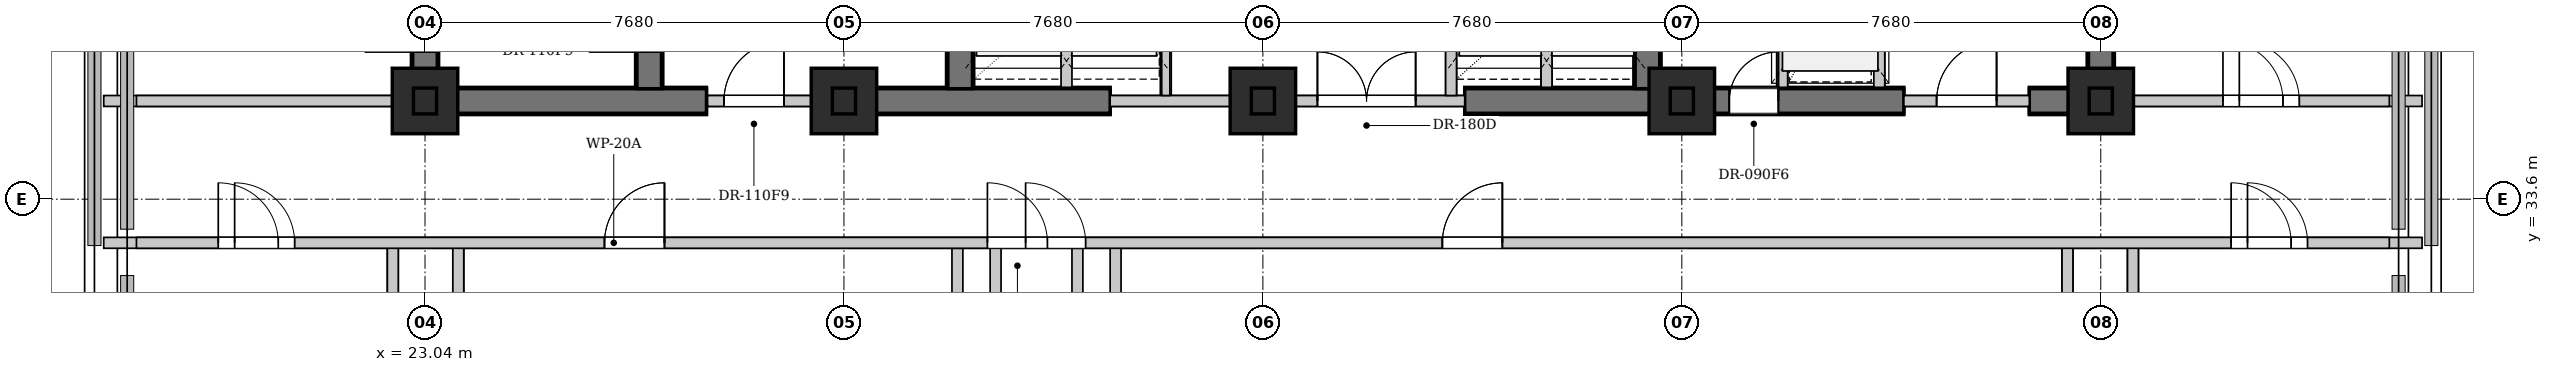
"""IFC4 building model, lengths in metres.
Left out: names, types, materials, properties, quantities, classifications, styles, units other than length and angle.
Written with IfcOpenShell. Run it as: python <this file> out.ifc"""

import sys

from ifc_helpers import new_model, si_unit, direction, frame, frame_2d, origin, origin_2d, place, context, subcontext, project, spatial, rectangle, extrude, element, fill, save


model = new_model("IFC4")
c1 = context("Model", 3, precision=1e-05, world=origin(), true_north=direction((0.0, 1.0)))
c2 = subcontext(c1, "Body", "Model", "MODEL_VIEW")
j1 = project(units=[si_unit("LENGTHUNIT", "METRE"), si_unit("PLANEANGLEUNIT", "RADIAN")], contexts=[c1])
p1 = place(None, origin())
s1 = spatial("IfcSite", under=j1, at=p1, CompositionType="ELEMENT")
p2 = place(p1, origin())
s2 = spatial("IfcBuilding", under=s1, at=p2, CompositionType="ELEMENT")
p3 = place(p2, frame((0.0, 0.0, 78.0)))
s3 = spatial("IfcBuildingStorey", under=s2, at=p3, CompositionType="ELEMENT", Elevation=78.0)
p4 = place(p3, frame((22.79, 35.4, 0.0), z_axis=(0.0, 0.0, 1.0), x_axis=(1.0, 0.0, 0.0)))
e1 = element("IfcWall", 1, at=p4, inside=s3, PredefinedType="SHEAR", context=c2, shape_type="SweptSolid", body=[
    extrude(rectangle(XDim=5.41, YDim=0.5, at=frame_2d((2.705, 0.0))), origin(), (0.0, 0.0, 1.0), 3.68),
])
p5 = place(p3, frame((30.72, 35.4, 0.0), z_axis=(0.0, 0.0, 1.0), x_axis=(1.0, 0.0, 0.0)))
e2 = element("IfcWall", 2, at=p5, inside=s3, PredefinedType="SHEAR", context=c2, shape_type="SweptSolid", body=[
    extrude(rectangle(XDim=4.88, YDim=0.5, at=frame_2d((2.44, 0.0))), origin(), (0.0, 0.0, 1.0), 3.68),
])
p6 = place(p3, frame((42.1, 35.4, 0.0), z_axis=(0.0, 0.0, 1.0), x_axis=(1.0, 0.0, 0.0)))
e3 = element("IfcWall", 3, at=p6, inside=s3, PredefinedType="SHEAR", context=c2, shape_type="SweptSolid", body=[
    extrude(rectangle(XDim=8.05, YDim=0.5, at=frame_2d((4.025, 0.0))), origin(), (0.0, 0.0, 1.0), 3.68),
])
p7 = place(p6, frame((4.85, 0.0, 0.0)))
e4 = element("IfcOpeningElement", 4, at=p7, cuts=e3, PredefinedType="OPENING", context=c2, shape_type="SweptSolid", body=[
    extrude(rectangle(XDim=0.9, YDim=2.15, at=frame_2d((0.45, 1.075))), frame((0.0, 0.26, 0.0), z_axis=(0.0, -1.0, 0.0), x_axis=(1.0, 0.0, 0.0)), (0.0, 0.0, 1.0), 0.52),
])
p8 = place(p3, frame((52.45, 35.4, 0.0), z_axis=(0.0, 0.0, 1.0), x_axis=(1.0, 0.0, 0.0)))
e5 = element("IfcWall", 5, at=p8, inside=s3, PredefinedType="SHEAR", context=c2, shape_type="SweptSolid", body=[
    extrude(rectangle(XDim=1.56, YDim=0.5, at=frame_2d((0.78, 0.0))), origin(), (0.0, 0.0, 1.0), 3.68),
])
p9 = place(p3, frame((23.04, 35.65, 0.0), z_axis=(0.0, 0.0, 1.0), x_axis=(0.0, 1.0, 0.0)))
e6 = element("IfcWall", 6, at=p9, inside=s3, PredefinedType="SHEAR", context=c2, shape_type="SweptSolid", body=[
    extrude(rectangle(XDim=10.3, YDim=0.5, at=frame_2d((5.15, 0.0))), origin(), (0.0, 0.0, 1.0), 3.68),
])
p10 = place(p9, frame((0.65, 0.0, 0.0)))
e7 = element("IfcOpeningElement", 7, at=p10, cuts=e6, PredefinedType="OPENING", context=c2, shape_type="SweptSolid", body=[
    extrude(rectangle(XDim=1.1, YDim=2.15, at=frame_2d((0.55, 1.075))), frame((0.0, 0.26, 0.0), z_axis=(0.0, -1.0, 0.0), x_axis=(1.0, 0.0, 0.0)), (0.0, 0.0, 1.0), 0.52),
])
p11 = place(p3, frame((27.15, 35.65, 0.0), z_axis=(0.0, 0.0, 1.0), x_axis=(0.0, 1.0, 0.0)))
e8 = element("IfcWall", 8, at=p11, inside=s3, PredefinedType="SHEAR", context=c2, shape_type="SweptSolid", body=[
    extrude(rectangle(XDim=10.3, YDim=0.5, at=frame_2d((5.15, 0.0))), origin(), (0.0, 0.0, 1.0), 3.68),
])
p12 = place(p11, frame((0.65, 0.0, 0.0)))
e9 = element("IfcOpeningElement", 9, at=p12, cuts=e8, PredefinedType="OPENING", context=c2, shape_type="SweptSolid", body=[
    extrude(rectangle(XDim=1.1, YDim=2.15, at=frame_2d((0.55, 1.075))), frame((0.0, 0.26, 0.0), z_axis=(0.0, -1.0, 0.0), x_axis=(1.0, 0.0, 0.0)), (0.0, 0.0, 1.0), 0.52),
])
for number, where, z_axis, x_axis in (
    (10, (32.85, 35.65, 0.0), (0.0, 0.0, 1.0), (0.0, 1.0, 0.0)),
    (11, (45.45, 35.65, 0.0), (0.0, 0.0, 1.0), (0.0, 1.0, 0.0)),
    (12, (53.76, 35.65, 0.0), (0.0, 0.0, 1.0), (0.0, 1.0, 0.0)),
):
    element("IfcWall", number, at=place(p3, frame(where, z_axis=z_axis, x_axis=x_axis)), inside=s3, PredefinedType="SHEAR", context=c2, shape_type="SweptSolid", body=[
        extrude(rectangle(XDim=10.3, YDim=0.5, at=frame_2d((5.15, 0.0))), origin(), (0.0, 0.0, 1.0), 3.68),
    ])
for number, where, z_axis, x_axis in (
    (13, (23.04, 35.4, 0.0), (0.0, 0.0, 1.0), (1.0, 0.0, 0.0)),
    (14, (30.72, 35.4, 0.0), (0.0, 0.0, 1.0), (1.0, 0.0, 0.0)),
    (15, (38.4, 35.4, 0.0), (0.0, 0.0, 1.0), (1.0, 0.0, 0.0)),
    (16, (46.08, 35.4, 0.0), (0.0, 0.0, 1.0), (1.0, 0.0, 0.0)),
    (17, (53.76, 35.4, 0.0), (0.0, 0.0, 1.0), (1.0, 0.0, 0.0)),
):
    element("IfcColumn", number, at=place(p3, frame(where, z_axis=z_axis, x_axis=x_axis)), inside=s3, PredefinedType="COLUMN", context=c2, shape_type="SweptSolid", body=[
        extrude(rectangle(XDim=1.2, YDim=1.2, at=origin_2d()), origin(), (0.0, 0.0, 1.0), 3.9),
    ])
p13 = place(p3, frame((28.22, 35.4, 0.0), z_axis=(0.0, 0.0, 1.0), x_axis=(1.0, 0.0, 0.0)))
e18 = element("IfcWall", 18, at=p13, inside=s3, PredefinedType="PARTITIONING", context=c2, shape_type="SweptSolid", body=[
    extrude(rectangle(XDim=2.5, YDim=0.2, at=frame_2d((1.25, 0.0))), origin(), (0.0, 0.0, 1.0), 2.765),
])
p14 = place(p13, frame((0.3, 0.0, 0.0)))
e19 = element("IfcOpeningElement", 19, at=p14, cuts=e18, PredefinedType="OPENING", context=c2, shape_type="SweptSolid", body=[
    extrude(rectangle(XDim=1.1, YDim=2.15, at=frame_2d((0.55, 1.075))), frame((0.0, 0.11, 0.0), z_axis=(0.0, -1.0, 0.0), x_axis=(1.0, 0.0, 0.0)), (0.0, 0.0, 1.0), 0.22),
])
p15 = place(p3, frame((35.6, 35.4, 0.0), z_axis=(0.0, 0.0, 1.0), x_axis=(1.0, 0.0, 0.0)))
e20 = element("IfcWall", 20, at=p15, inside=s3, PredefinedType="PARTITIONING", context=c2, shape_type="SweptSolid", body=[
    extrude(rectangle(XDim=6.5, YDim=0.2, at=frame_2d((3.25, 0.0))), origin(), (0.0, 0.0, 1.0), 2.765),
])
p16 = place(p15, frame((3.8, 0.0, 0.0)))
e21 = element("IfcOpeningElement", 21, at=p16, cuts=e20, PredefinedType="OPENING", context=c2, shape_type="SweptSolid", body=[
    extrude(rectangle(XDim=1.8, YDim=2.3, at=frame_2d((0.9, 1.15))), frame((0.0, 0.11, 0.0), z_axis=(0.0, -1.0, 0.0), x_axis=(1.0, 0.0, 0.0)), (0.0, 0.0, 1.0), 0.22),
])
p17 = place(p3, frame((34.8, 35.65, 0.0), z_axis=(0.0, 0.0, 1.0), x_axis=(0.0, 1.0, 0.0)))
e22 = element("IfcWall", 22, at=p17, inside=s3, PredefinedType="PARTITIONING", context=c2, shape_type="SweptSolid", body=[
    extrude(rectangle(XDim=3.25, YDim=0.2, at=frame_2d((1.625, 0.0))), origin(), (0.0, 0.0, 1.0), 3.68),
])
p18 = place(p3, frame((36.62, 35.5, 0.0), z_axis=(0.0, 0.0, 1.0), x_axis=(0.0, 1.0, 0.0)))
e23 = element("IfcWall", 23, at=p18, inside=s3, PredefinedType="PARTITIONING", context=c2, shape_type="SweptSolid", body=[
    extrude(rectangle(XDim=3.4, YDim=0.2, at=frame_2d((1.7, 0.0))), origin(), (0.0, 0.0, 1.0), 3.68),
])
p19 = place(p3, frame((43.6, 35.65, 0.0), z_axis=(0.0, 0.0, 1.0), x_axis=(0.0, 1.0, 0.0)))
e24 = element("IfcWall", 24, at=p19, inside=s3, PredefinedType="PARTITIONING", context=c2, shape_type="SweptSolid", body=[
    extrude(rectangle(XDim=3.25, YDim=0.2, at=frame_2d((1.625, 0.0))), origin(), (0.0, 0.0, 1.0), 3.68),
])
p20 = place(p3, frame((41.85, 35.5, 0.0), z_axis=(0.0, 0.0, 1.0), x_axis=(0.0, 1.0, 0.0)))
e25 = element("IfcWall", 25, at=p20, inside=s3, PredefinedType="PARTITIONING", context=c2, shape_type="SweptSolid", body=[
    extrude(rectangle(XDim=3.4, YDim=0.2, at=frame_2d((1.7, 0.0))), origin(), (0.0, 0.0, 1.0), 3.68),
])
p21 = place(p3, frame((50.15, 35.4, 0.0), z_axis=(0.0, 0.0, 1.0), x_axis=(1.0, 0.0, 0.0)))
e26 = element("IfcWall", 26, at=p21, inside=s3, PredefinedType="PARTITIONING", context=c2, shape_type="SweptSolid", body=[
    extrude(rectangle(XDim=2.3, YDim=0.2, at=frame_2d((1.15, 0.0))), origin(), (0.0, 0.0, 1.0), 2.765),
])
p22 = place(p21, frame((0.6, 0.0, 0.0)))
e27 = element("IfcOpeningElement", 27, at=p22, cuts=e26, PredefinedType="OPENING", context=c2, shape_type="SweptSolid", body=[
    extrude(rectangle(XDim=1.1, YDim=2.15, at=frame_2d((0.55, 1.075))), frame((0.0, 0.11, 0.0), z_axis=(0.0, -1.0, 0.0), x_axis=(1.0, 0.0, 0.0)), (0.0, 0.0, 1.0), 0.22),
])
p23 = place(p3, frame((49.7, 35.65, 0.0), z_axis=(0.0, 0.0, 1.0), x_axis=(0.0, 1.0, 0.0)))
e28 = element("IfcWall", 28, at=p23, inside=s3, PredefinedType="PARTITIONING", context=c2, shape_type="SweptSolid", body=[
    extrude(rectangle(XDim=3.15, YDim=0.2, at=frame_2d((1.575, 0.0))), origin(), (0.0, 0.0, 1.0), 3.68),
])
p24 = place(p23, frame((0.85, 0.0, 0.0)))
e29 = element("IfcOpeningElement", 29, at=p24, cuts=e28, PredefinedType="OPENING", context=c2, shape_type="SweptSolid", body=[
    extrude(rectangle(XDim=1.2, YDim=2.2, at=frame_2d((0.6, 1.1))), frame((0.0, 0.11, 0.0), z_axis=(0.0, -1.0, 0.0), x_axis=(1.0, 0.0, 0.0)), (0.0, 0.0, 1.0), 0.22),
])
p25 = place(p3, frame((47.92, 35.65, 0.0), z_axis=(0.0, 0.0, 1.0), x_axis=(0.0, 1.0, 0.0)))
e30 = element("IfcWall", 30, at=p25, inside=s3, PredefinedType="PARTITIONING", context=c2, shape_type="SweptSolid", body=[
    extrude(rectangle(XDim=3.15, YDim=0.2, at=frame_2d((1.575, 0.0))), origin(), (0.0, 0.0, 1.0), 3.68),
])
p26 = place(p3, frame((17.15, 35.4, 0.0), z_axis=(0.0, 0.0, 1.0), x_axis=(1.0, 0.0, 0.0)))
e31 = element("IfcWall", 31, at=p26, inside=s3, PredefinedType="PARTITIONING", context=c2, shape_type="SweptSolid", body=[
    extrude(rectangle(XDim=5.6, YDim=0.2, at=frame_2d((2.8, 0.0))), origin(), (0.0, 0.0, 1.0), 3.68),
])
p27 = place(p3, frame((54.05, 35.4, 0.0), z_axis=(0.0, 0.0, 1.0), x_axis=(1.0, 0.0, 0.0)))
e32 = element("IfcWall", 32, at=p27, inside=s3, PredefinedType="PARTITIONING", context=c2, shape_type="SweptSolid", body=[
    extrude(rectangle(XDim=5.6, YDim=0.2, at=frame_2d((2.8, 0.0))), origin(), (0.0, 0.0, 1.0), 3.68),
])
p28 = place(p27, frame((2.25, 0.0, 0.0)))
e33 = element("IfcOpeningElement", 33, at=p28, cuts=e32, PredefinedType="OPENING", context=c2, shape_type="SweptSolid", body=[
    extrude(rectangle(XDim=1.1, YDim=2.15, at=frame_2d((0.55, 1.075))), frame((0.0, 0.11, 0.0), z_axis=(0.0, -1.0, 0.0), x_axis=(1.0, 0.0, 0.0)), (0.0, 0.0, 1.0), 0.22),
])
for number, where, z_axis, x_axis in (
    (34, (22.45, 22.38, 0.0), (0.0, 0.0, 1.0), (0.0, 1.0, 0.0)),
    (35, (23.65, 22.38, 0.0), (0.0, 0.0, 1.0), (0.0, 1.0, 0.0)),
    (36, (53.15, 22.38, 0.0), (0.0, 0.0, 1.0), (0.0, 1.0, 0.0)),
    (37, (54.35, 22.38, 0.0), (0.0, 0.0, 1.0), (0.0, 1.0, 0.0)),
):
    element("IfcWall", number, at=place(p3, frame(where, z_axis=z_axis, x_axis=x_axis)), inside=s3, PredefinedType="PARTITIONING", context=c2, shape_type="SweptSolid", body=[
        extrude(rectangle(XDim=10.42, YDim=0.2, at=frame_2d((5.21, 0.0))), origin(), (0.0, 0.0, 1.0), 3.68),
    ])
for number, where, z_axis, x_axis in (
    (38, (32.8, 24.85, 0.0), (0.0, 0.0, 1.0), (0.0, 1.0, 0.0)),
    (39, (35.0, 24.85, 0.0), (0.0, 0.0, 1.0), (0.0, 1.0, 0.0)),
):
    element("IfcWall", number, at=place(p3, frame(where, z_axis=z_axis, x_axis=x_axis)), inside=s3, PredefinedType="PARTITIONING", context=c2, shape_type="SweptSolid", body=[
        extrude(rectangle(XDim=7.95, YDim=0.2, at=frame_2d((3.975, 0.0))), origin(), (0.0, 0.0, 1.0), 3.68),
    ])
p29 = place(p3, frame((17.15, 32.8, 0.0), z_axis=(0.0, 0.0, 1.0), x_axis=(1.0, 0.0, 0.0)))
e40 = element("IfcWall", 40, at=p29, inside=s3, PredefinedType="PARTITIONING", context=c2, shape_type="SweptSolid", body=[
    extrude(rectangle(XDim=42.5, YDim=0.2, at=frame_2d((21.25, 0.0))), origin(), (0.0, 0.0, 1.0), 3.68),
])
p30 = place(p29, frame((2.1, 0.0, 0.0)))
e41 = element("IfcOpeningElement", 41, at=p30, cuts=e40, PredefinedType="OPENING", context=c2, shape_type="SweptSolid", body=[
    extrude(rectangle(XDim=1.1, YDim=2.15, at=frame_2d((0.55, 1.075))), frame((0.0, 0.11, 0.0), z_axis=(0.0, -1.0, 0.0), x_axis=(1.0, 0.0, 0.0)), (0.0, 0.0, 1.0), 0.22),
])
p31 = place(p29, frame((9.18, 0.0, 0.0)))
e42 = element("IfcOpeningElement", 42, at=p31, cuts=e40, PredefinedType="OPENING", context=c2, shape_type="SweptSolid", body=[
    extrude(rectangle(XDim=1.1, YDim=2.15, at=frame_2d((0.55, 1.075))), frame((0.0, 0.11, 0.0), z_axis=(0.0, -1.0, 0.0), x_axis=(1.0, 0.0, 0.0)), (0.0, 0.0, 1.0), 0.22),
])
p32 = place(p29, frame((16.2, 0.0, 0.0)))
e43 = element("IfcOpeningElement", 43, at=p32, cuts=e40, PredefinedType="OPENING", context=c2, shape_type="SweptSolid", body=[
    extrude(rectangle(XDim=1.1, YDim=2.15, at=frame_2d((0.55, 1.075))), frame((0.0, 0.11, 0.0), z_axis=(0.0, -1.0, 0.0), x_axis=(1.0, 0.0, 0.0)), (0.0, 0.0, 1.0), 0.22),
])
p33 = place(p29, frame((24.54, 0.0, 0.0)))
e44 = element("IfcOpeningElement", 44, at=p33, cuts=e40, PredefinedType="OPENING", context=c2, shape_type="SweptSolid", body=[
    extrude(rectangle(XDim=1.1, YDim=2.15, at=frame_2d((0.55, 1.075))), frame((0.0, 0.11, 0.0), z_axis=(0.0, -1.0, 0.0), x_axis=(1.0, 0.0, 0.0)), (0.0, 0.0, 1.0), 0.22),
])
p34 = place(p29, frame((39.3, 0.0, 0.0)))
e45 = element("IfcOpeningElement", 45, at=p34, cuts=e40, PredefinedType="OPENING", context=c2, shape_type="SweptSolid", body=[
    extrude(rectangle(XDim=1.1, YDim=2.15, at=frame_2d((0.55, 1.075))), frame((0.0, 0.11, 0.0), z_axis=(0.0, -1.0, 0.0), x_axis=(1.0, 0.0, 0.0)), (0.0, 0.0, 1.0), 0.22),
])
p35 = place(p14, origin())
e46 = element("IfcDoor", 46, at=p35, inside=s3, OperationType="SINGLE_SWING_RIGHT", PredefinedType="DOOR", context=c2, shape_type="SweptSolid", body=[
    extrude(rectangle(XDim=1.1, YDim=2.15, at=frame_2d((0.55, 1.075))), frame((0.0, 0.025, 0.0), z_axis=(0.0, -1.0, 0.0), x_axis=(1.0, 0.0, 0.0)), (0.0, 0.0, 1.0), 0.05),
])
fill(e19, e46)
p36 = place(p16, origin())
e47 = element("IfcDoor", 47, at=p36, inside=s3, OperationType="DOUBLE_DOOR_SINGLE_SWING", PredefinedType="DOOR", context=c2, shape_type="SweptSolid", body=[
    extrude(rectangle(XDim=1.8, YDim=2.3, at=frame_2d((0.9, 1.15))), frame((0.0, 0.025, 0.0), z_axis=(0.0, -1.0, 0.0), x_axis=(1.0, 0.0, 0.0)), (0.0, 0.0, 1.0), 0.05),
])
fill(e21, e47)
p37 = place(p22, origin())
e48 = element("IfcDoor", 48, at=p37, inside=s3, OperationType="SINGLE_SWING_RIGHT", PredefinedType="DOOR", context=c2, shape_type="SweptSolid", body=[
    extrude(rectangle(XDim=1.1, YDim=2.15, at=frame_2d((0.55, 1.075))), frame((0.0, 0.025, 0.0), z_axis=(0.0, -1.0, 0.0), x_axis=(1.0, 0.0, 0.0)), (0.0, 0.0, 1.0), 0.05),
])
fill(e27, e48)
p38 = place(p28, origin())
e49 = element("IfcDoor", 49, at=p38, inside=s3, OperationType="SINGLE_SWING_LEFT", PredefinedType="DOOR", context=c2, shape_type="SweptSolid", body=[
    extrude(rectangle(XDim=1.1, YDim=2.15, at=frame_2d((0.55, 1.075))), frame((0.0, 0.025, 0.0), z_axis=(0.0, -1.0, 0.0), x_axis=(1.0, 0.0, 0.0)), (0.0, 0.0, 1.0), 0.05),
])
fill(e33, e49)
p39 = place(p30, origin())
e50 = element("IfcDoor", 50, at=p39, inside=s3, OperationType="SINGLE_SWING_LEFT", PredefinedType="DOOR", context=c2, shape_type="SweptSolid", body=[
    extrude(rectangle(XDim=1.1, YDim=2.15, at=frame_2d((0.55, 1.075))), frame((0.0, 0.025, 0.0), z_axis=(0.0, -1.0, 0.0), x_axis=(1.0, 0.0, 0.0)), (0.0, 0.0, 1.0), 0.05),
])
fill(e41, e50)
p40 = place(p31, origin())
e51 = element("IfcDoor", 51, at=p40, inside=s3, OperationType="SINGLE_SWING_RIGHT", PredefinedType="DOOR", context=c2, shape_type="SweptSolid", body=[
    extrude(rectangle(XDim=1.1, YDim=2.15, at=frame_2d((0.55, 1.075))), frame((0.0, 0.025, 0.0), z_axis=(0.0, -1.0, 0.0), x_axis=(1.0, 0.0, 0.0)), (0.0, 0.0, 1.0), 0.05),
])
fill(e42, e51)
p41 = place(p32, origin())
e52 = element("IfcDoor", 52, at=p41, inside=s3, OperationType="SINGLE_SWING_LEFT", PredefinedType="DOOR", context=c2, shape_type="SweptSolid", body=[
    extrude(rectangle(XDim=1.1, YDim=2.15, at=frame_2d((0.55, 1.075))), frame((0.0, 0.025, 0.0), z_axis=(0.0, -1.0, 0.0), x_axis=(1.0, 0.0, 0.0)), (0.0, 0.0, 1.0), 0.05),
])
fill(e43, e52)
p42 = place(p33, origin())
e53 = element("IfcDoor", 53, at=p42, inside=s3, OperationType="SINGLE_SWING_RIGHT", PredefinedType="DOOR", context=c2, shape_type="SweptSolid", body=[
    extrude(rectangle(XDim=1.1, YDim=2.15, at=frame_2d((0.55, 1.075))), frame((0.0, 0.025, 0.0), z_axis=(0.0, -1.0, 0.0), x_axis=(1.0, 0.0, 0.0)), (0.0, 0.0, 1.0), 0.05),
])
fill(e44, e53)
p43 = place(p34, origin())
e54 = element("IfcDoor", 54, at=p43, inside=s3, OperationType="SINGLE_SWING_LEFT", PredefinedType="DOOR", context=c2, shape_type="SweptSolid", body=[
    extrude(rectangle(XDim=1.1, YDim=2.15, at=frame_2d((0.55, 1.075))), frame((0.0, 0.025, 0.0), z_axis=(0.0, -1.0, 0.0), x_axis=(1.0, 0.0, 0.0)), (0.0, 0.0, 1.0), 0.05),
])
fill(e45, e54)
p44 = place(p7, origin())
e55 = element("IfcDoor", 55, at=p44, inside=s3, OperationType="SINGLE_SWING_RIGHT", PredefinedType="DOOR", context=c2, shape_type="SweptSolid", body=[
    extrude(rectangle(XDim=0.9, YDim=2.15, at=frame_2d((0.45, 1.075))), frame((0.0, 0.025, 0.0), z_axis=(0.0, -1.0, 0.0), x_axis=(1.0, 0.0, 0.0)), (0.0, 0.0, 1.0), 0.05),
])
fill(e4, e55)
save(model, sys.argv[1])
